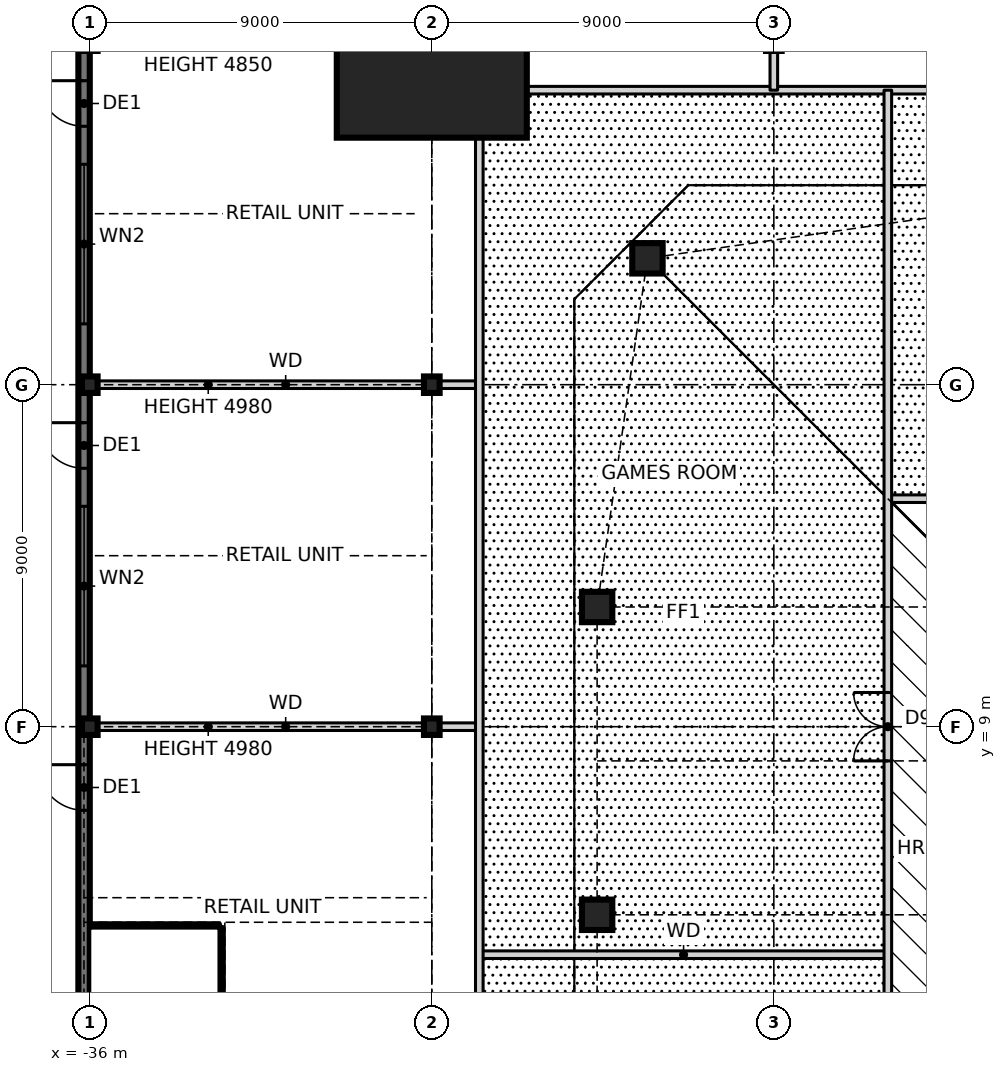
"""IFC4 building model, lengths in metres.
Left out: names, types, materials, properties, quantities, classifications, styles, units other than length and angle.
Written with IfcOpenShell. Run it as: python <this file> out.ifc"""

import sys

from ifc_helpers import new_model, si_unit, direction, frame, frame_2d, origin, origin_2d, place, context, subcontext, project, spatial, rectangle, hollow_rectangle, i_section, extrude, element, fill, save


model = new_model("IFC4")
c1 = context("Model", 3, precision=1e-05, world=origin(), true_north=direction((0.0, 1.0)))
c2 = subcontext(c1, "Body", "Model", "MODEL_VIEW")
j1 = project(units=[si_unit("LENGTHUNIT", "METRE"), si_unit("PLANEANGLEUNIT", "RADIAN")], contexts=[c1])
p1 = place(None, origin())
s1 = spatial("IfcSite", under=j1, at=p1, CompositionType="ELEMENT")
p2 = place(p1, origin())
s2 = spatial("IfcBuilding", under=s1, at=p2, CompositionType="ELEMENT")
p3 = place(p2, origin())
s3 = spatial("IfcBuildingStorey", under=s2, at=p3, CompositionType="ELEMENT", Elevation=0.0)
for number, where, z_axis, x_axis in (
    (1, (-21.326, 21.326, 0.0), (0.0, 0.0, 1.0), (1.0, 0.0, 0.0)),
    (2, (-22.65, 12.15, 0.0), (0.0, 0.0, 1.0), (1.0, 0.0, 0.0)),
    (3, (-22.65, 4.05, 0.0), (0.0, 0.0, 1.0), (1.0, 0.0, 0.0)),
):
    element("IfcColumn", number, at=place(p3, frame(where, z_axis=z_axis, x_axis=x_axis)), inside=s3, PredefinedType="COLUMN", context=c2, shape_type="SweptSolid", body=[
        extrude(hollow_rectangle(XDim=0.8, YDim=0.8, WallThickness=0.09, at=origin_2d()), origin(), (0.0, 0.0, 1.0), 6.0),
    ])
p4 = place(p3, frame((-27.0, 27.0, 0.0), z_axis=(0.0, 0.0, 1.0), x_axis=(1.0, 0.0, 0.0)))
e4 = element("IfcColumn", 4, at=p4, inside=s3, PredefinedType="COLUMN", context=c2, shape_type="SweptSolid", body=[
    extrude(rectangle(XDim=5.0, YDim=5.0, at=origin_2d()), origin(), (0.0, 0.0, 1.0), 6.0),
    extrude(i_section(OverallWidth=0.478, OverallDepth=0.599, WebThickness=0.1, FlangeThickness=0.14, at=origin_2d()), origin(), (0.0, 0.0, 1.0), 6.0),
])
for number, where, z_axis, x_axis in (
    (5, (-36.0, 9.0, 0.0), (0.0, 0.0, 1.0), (1.0, 0.0, 0.0)),
    (6, (-36.0, 18.0, 0.0), (0.0, 0.0, 1.0), (1.0, 0.0, 0.0)),
    (7, (-27.0, 9.0, 0.0), (0.0, 0.0, 1.0), (1.0, 0.0, 0.0)),
    (8, (-27.0, 18.0, 0.0), (0.0, 0.0, 1.0), (1.0, 0.0, 0.0)),
):
    element("IfcColumn", number, at=place(p3, frame(where, z_axis=z_axis, x_axis=x_axis)), inside=s3, PredefinedType="COLUMN", context=c2, shape_type="SweptSolid", body=[
        extrude(i_section(OverallWidth=0.411, OverallDepth=0.434, WebThickness=0.036, FlangeThickness=0.057, at=origin_2d()), origin(), (0.0, 0.0, 1.0), 6.0),
    ])
p5 = place(p3, frame((-36.15, 36.3, -0.25), z_axis=(0.0, 0.0, 1.0), x_axis=(0.0, -1.0, 0.0)))
e9 = element("IfcWall", 9, at=p5, inside=s3, PredefinedType="SOLIDWALL", context=c2, shape_type="SweptSolid", body=[
    extrude(rectangle(XDim=72.6, YDim=0.3, at=frame_2d((36.3, 0.0))), origin(), (0.0, 0.0, 1.0), 5.23),
])
p6 = place(p5, frame((55.3, 0.0, 0.25)))
e10 = element("IfcOpeningElement", 10, at=p6, cuts=e9, PredefinedType="OPENING", context=c2, shape_type="SweptSolid", body=[
    extrude(rectangle(XDim=1.2, YDim=2.4, at=frame_2d((0.6, 1.2))), frame((0.0, 0.16, 0.0), z_axis=(0.0, -1.0, 0.0), x_axis=(1.0, 0.0, 0.0)), (0.0, 0.0, 1.0), 0.32),
])
p7 = place(p5, frame((57.5, 0.0, 0.85)))
e11 = element("IfcOpeningElement", 11, at=p7, cuts=e9, PredefinedType="OPENING", context=c2, shape_type="SweptSolid", body=[
    extrude(rectangle(XDim=4.2, YDim=3.6, at=frame_2d((2.1, 1.8))), frame((0.0, 0.16, 0.0), z_axis=(0.0, -1.0, 0.0), x_axis=(1.0, 0.0, 0.0)), (0.0, 0.0, 1.0), 0.32),
])
p8 = place(p5, frame((46.3, 0.0, 0.25)))
e12 = element("IfcOpeningElement", 12, at=p8, cuts=e9, PredefinedType="OPENING", context=c2, shape_type="SweptSolid", body=[
    extrude(rectangle(XDim=1.2, YDim=2.4, at=frame_2d((0.6, 1.2))), frame((0.0, 0.16, 0.0), z_axis=(0.0, -1.0, 0.0), x_axis=(1.0, 0.0, 0.0)), (0.0, 0.0, 1.0), 0.32),
])
p9 = place(p5, frame((48.5, 0.0, 0.85)))
e13 = element("IfcOpeningElement", 13, at=p9, cuts=e9, PredefinedType="OPENING", context=c2, shape_type="SweptSolid", body=[
    extrude(rectangle(XDim=4.2, YDim=3.6, at=frame_2d((2.1, 1.8))), frame((0.0, 0.16, 0.0), z_axis=(0.0, -1.0, 0.0), x_axis=(1.0, 0.0, 0.0)), (0.0, 0.0, 1.0), 0.32),
])
p10 = place(p5, frame((19.3, 0.0, 0.25)))
e14 = element("IfcOpeningElement", 14, at=p10, cuts=e9, PredefinedType="OPENING", context=c2, shape_type="SweptSolid", body=[
    extrude(rectangle(XDim=1.2, YDim=2.4, at=frame_2d((0.6, 1.2))), frame((0.0, 0.16, 0.0), z_axis=(0.0, -1.0, 0.0), x_axis=(1.0, 0.0, 0.0)), (0.0, 0.0, 1.0), 0.32),
])
p11 = place(p5, frame((21.5, 0.0, 0.85)))
e15 = element("IfcOpeningElement", 15, at=p11, cuts=e9, PredefinedType="OPENING", context=c2, shape_type="SweptSolid", body=[
    extrude(rectangle(XDim=4.2, YDim=3.6, at=frame_2d((2.1, 1.8))), frame((0.0, 0.16, 0.0), z_axis=(0.0, -1.0, 0.0), x_axis=(1.0, 0.0, 0.0)), (0.0, 0.0, 1.0), 0.32),
])
p12 = place(p5, frame((10.3, 0.0, 0.25)))
e16 = element("IfcOpeningElement", 16, at=p12, cuts=e9, PredefinedType="OPENING", context=c2, shape_type="SweptSolid", body=[
    extrude(rectangle(XDim=1.2, YDim=2.4, at=frame_2d((0.6, 1.2))), frame((0.0, 0.16, 0.0), z_axis=(0.0, -1.0, 0.0), x_axis=(1.0, 0.0, 0.0)), (0.0, 0.0, 1.0), 0.32),
])
p13 = place(p5, frame((12.5, 0.0, 0.85)))
e17 = element("IfcOpeningElement", 17, at=p13, cuts=e9, PredefinedType="OPENING", context=c2, shape_type="SweptSolid", body=[
    extrude(rectangle(XDim=4.2, YDim=3.6, at=frame_2d((2.1, 1.8))), frame((0.0, 0.16, 0.0), z_axis=(0.0, -1.0, 0.0), x_axis=(1.0, 0.0, 0.0)), (0.0, 0.0, 1.0), 0.32),
])
p14 = place(p5, frame((38.55, 0.0, 0.25)))
e18 = element("IfcOpeningElement", 18, at=p14, cuts=e9, PredefinedType="OPENING", context=c2, shape_type="SweptSolid", body=[
    extrude(rectangle(XDim=1.2, YDim=2.4, at=frame_2d((0.6, 1.2))), frame((0.0, 0.16, 0.0), z_axis=(0.0, -1.0, 0.0), x_axis=(1.0, 0.0, 0.0)), (0.0, 0.0, 1.0), 0.32),
])
p15 = place(p5, frame((42.3, 0.0, 0.25)))
e19 = element("IfcOpeningElement", 19, at=p15, cuts=e9, PredefinedType="OPENING", context=c2, shape_type="SweptSolid", body=[
    extrude(rectangle(XDim=1.2, YDim=2.4, at=frame_2d((0.6, 1.2))), frame((0.0, 0.16, 0.0), z_axis=(0.0, -1.0, 0.0), x_axis=(1.0, 0.0, 0.0)), (0.0, 0.0, 1.0), 0.32),
])
p16 = place(p5, frame((28.3, 0.0, 0.25)))
e20 = element("IfcOpeningElement", 20, at=p16, cuts=e9, PredefinedType="OPENING", context=c2, shape_type="SweptSolid", body=[
    extrude(rectangle(XDim=1.2, YDim=2.4, at=frame_2d((0.6, 1.2))), frame((0.0, 0.16, 0.0), z_axis=(0.0, -1.0, 0.0), x_axis=(1.0, 0.0, 0.0)), (0.0, 0.0, 1.0), 0.32),
])
p17 = place(p3, frame((-25.75, 3.0, 0.0), z_axis=(0.0, 0.0, 1.0), x_axis=(1.0, 0.0, 0.0)))
e21 = element("IfcWall", 21, at=p17, inside=s3, PredefinedType="SOLIDWALL", context=c2, shape_type="SweptSolid", body=[
    extrude(rectangle(XDim=10.75, YDim=0.2, at=frame_2d((5.375, 0.0))), origin(), (0.0, 0.0, 1.0), 5.75),
])
p18 = place(p3, frame((-35.94, 3.7, 0.0), z_axis=(0.0, 0.0, 1.0), x_axis=(1.0, 0.0, 0.0)))
e22 = element("IfcWall", 22, at=p18, inside=s3, PredefinedType="SOLIDWALL", context=c2, shape_type="SweptSolid", body=[
    extrude(rectangle(XDim=3.34, YDim=0.2, at=frame_2d((1.67, 0.0))), origin(), (0.0, 0.0, 1.0), 6.0),
])
p19 = place(p3, frame((-35.94, 9.0, 0.0), z_axis=(0.0, 0.0, 1.0), x_axis=(1.0, 0.0, 0.0)))
e23 = element("IfcWall", 23, at=p19, inside=s3, PredefinedType="SOLIDWALL", context=c2, shape_type="SweptSolid", body=[
    extrude(rectangle(XDim=10.19, YDim=0.2, at=frame_2d((5.095, 0.0))), origin(), (0.0, 0.0, 1.0), 4.98),
])
p20 = place(p3, frame((-15.0, 15.0, 0.0), z_axis=(0.0, 0.0, 1.0), x_axis=(1.0, 0.0, 0.0)))
e24 = element("IfcWall", 24, at=p20, inside=s3, PredefinedType="SOLIDWALL", context=c2, shape_type="SweptSolid", body=[
    extrude(rectangle(XDim=30.0, YDim=0.2, at=frame_2d((15.0, 0.0))), origin(), (0.0, 0.0, 1.0), 5.75),
])
p21 = place(p20, frame((9.15, 0.0, 0.0)))
e25 = element("IfcOpeningElement", 25, at=p21, cuts=e24, PredefinedType="OPENING", context=c2, shape_type="SweptSolid", body=[
    extrude(rectangle(XDim=0.9, YDim=2.1, at=frame_2d((0.45, 1.05))), frame((0.0, 0.11, 0.0), z_axis=(0.0, -1.0, 0.0), x_axis=(1.0, 0.0, 0.0)), (0.0, 0.0, 1.0), 0.22),
])
p22 = place(p20, frame((12.75, 0.0, 0.0)))
e26 = element("IfcOpeningElement", 26, at=p22, cuts=e24, PredefinedType="OPENING", context=c2, shape_type="SweptSolid", body=[
    extrude(rectangle(XDim=0.9, YDim=2.1, at=frame_2d((0.45, 1.05))), frame((0.0, 0.11, 0.0), z_axis=(0.0, -1.0, 0.0), x_axis=(1.0, 0.0, 0.0)), (0.0, 0.0, 1.0), 0.22),
])
p23 = place(p20, frame((15.85, 0.0, 0.0)))
e27 = element("IfcOpeningElement", 27, at=p23, cuts=e24, PredefinedType="OPENING", context=c2, shape_type="SweptSolid", body=[
    extrude(rectangle(XDim=0.9, YDim=2.1, at=frame_2d((0.45, 1.05))), frame((0.0, 0.11, 0.0), z_axis=(0.0, -1.0, 0.0), x_axis=(1.0, 0.0, 0.0)), (0.0, 0.0, 1.0), 0.22),
])
p24 = place(p20, frame((22.9, 0.0, 0.0)))
e28 = element("IfcOpeningElement", 28, at=p24, cuts=e24, PredefinedType="OPENING", context=c2, shape_type="SweptSolid", body=[
    extrude(rectangle(XDim=1.8, YDim=2.1, at=frame_2d((0.9, 1.05))), frame((0.0, 0.11, 0.0), z_axis=(0.0, -1.0, 0.0), x_axis=(1.0, 0.0, 0.0)), (0.0, 0.0, 1.0), 0.22),
])
p25 = place(p3, frame((-35.94, 18.0, 0.0), z_axis=(0.0, 0.0, 1.0), x_axis=(1.0, 0.0, 0.0)))
e29 = element("IfcWall", 29, at=p25, inside=s3, PredefinedType="SOLIDWALL", context=c2, shape_type="SweptSolid", body=[
    extrude(rectangle(XDim=10.19, YDim=0.2, at=frame_2d((5.095, 0.0))), origin(), (0.0, 0.0, 1.0), 4.98),
])
p26 = place(p3, frame((-25.75, 25.75, 0.0), z_axis=(0.0, 0.0, 1.0), x_axis=(1.0, 0.0, 0.0)))
e30 = element("IfcWall", 30, at=p26, inside=s3, PredefinedType="SOLIDWALL", context=c2, shape_type="SweptSolid", body=[
    extrude(rectangle(XDim=51.5, YDim=0.2, at=frame_2d((25.75, 0.0))), origin(), (0.0, 0.0, 1.0), 5.75),
])
p27 = place(p3, frame((-15.0, -25.75, 0.0), z_axis=(0.0, 0.0, 1.0), x_axis=(0.0, 1.0, 0.0)))
e31 = element("IfcWall", 31, at=p27, inside=s3, PredefinedType="SOLIDWALL", context=c2, shape_type="SweptSolid", body=[
    extrude(rectangle(XDim=51.5, YDim=0.2, at=frame_2d((25.75, 0.0))), origin(), (0.0, 0.0, 1.0), 5.75),
])
p28 = place(p27, frame((33.85, 0.0, 0.0)))
e32 = element("IfcOpeningElement", 32, at=p28, cuts=e31, PredefinedType="OPENING", context=c2, shape_type="SweptSolid", body=[
    extrude(rectangle(XDim=1.8, YDim=2.1, at=frame_2d((0.9, 1.05))), frame((0.0, 0.11, 0.0), z_axis=(0.0, -1.0, 0.0), x_axis=(1.0, 0.0, 0.0)), (0.0, 0.0, 1.0), 0.22),
])
p29 = place(p27, frame((24.85, 0.0, 0.0)))
e33 = element("IfcOpeningElement", 33, at=p29, cuts=e31, PredefinedType="OPENING", context=c2, shape_type="SweptSolid", body=[
    extrude(rectangle(XDim=1.8, YDim=2.1, at=frame_2d((0.9, 1.05))), frame((0.0, 0.11, 0.0), z_axis=(0.0, -1.0, 0.0), x_axis=(1.0, 0.0, 0.0)), (0.0, 0.0, 1.0), 0.22),
])
p30 = place(p27, frame((15.85, 0.0, 0.0)))
e34 = element("IfcOpeningElement", 34, at=p30, cuts=e31, PredefinedType="OPENING", context=c2, shape_type="SweptSolid", body=[
    extrude(rectangle(XDim=1.8, YDim=2.1, at=frame_2d((0.9, 1.05))), frame((0.0, 0.11, 0.0), z_axis=(0.0, -1.0, 0.0), x_axis=(1.0, 0.0, 0.0)), (0.0, 0.0, 1.0), 0.22),
])
p31 = place(p3, frame((-18.0, 25.75, 0.0), z_axis=(0.0, 0.0, 1.0), x_axis=(0.0, 1.0, 0.0)))
e35 = element("IfcWall", 35, at=p31, inside=s3, PredefinedType="SOLIDWALL", context=c2, shape_type="SweptSolid", body=[
    extrude(rectangle(XDim=10.19, YDim=0.2, at=frame_2d((5.095, 0.0))), origin(), (0.0, 0.0, 1.0), 4.98),
])
p32 = place(p3, frame((-25.75, -27.0, 0.0), z_axis=(0.0, 0.0, 1.0), x_axis=(0.0, 1.0, 0.0)))
e36 = element("IfcWall", 36, at=p32, inside=s3, PredefinedType="SOLIDWALL", context=c2, shape_type="SweptSolid", body=[
    extrude(rectangle(XDim=54.0, YDim=0.2, at=frame_2d((27.0, 0.0))), origin(), (0.0, 0.0, 1.0), 5.75),
])
p33 = place(p3, frame((-32.6, -3.7, 0.0), z_axis=(0.0, 0.0, 1.0), x_axis=(0.0, 1.0, 0.0)))
e37 = element("IfcWall", 37, at=p33, inside=s3, PredefinedType="SOLIDWALL", context=c2, shape_type="SweptSolid", body=[
    extrude(rectangle(XDim=7.4, YDim=0.2, at=frame_2d((3.7, 0.0))), origin(), (0.0, 0.0, 1.0), 6.0),
])
p34 = place(p10, frame((1.2, 0.0, 0.0), z_axis=(0.0, 0.0, 1.0), x_axis=(-1.0, 0.0, 0.0)))
e38 = element("IfcDoor", 38, at=p34, inside=s3, OperationType="SINGLE_SWING_RIGHT", PredefinedType="DOOR", context=c2, shape_type="SweptSolid", body=[
    extrude(rectangle(XDim=1.2, YDim=2.4, at=frame_2d((0.6, 1.2))), frame((0.0, 0.025, 0.0), z_axis=(0.0, -1.0, 0.0), x_axis=(1.0, 0.0, 0.0)), (0.0, 0.0, 1.0), 0.05),
])
fill(e14, e38)
p35 = place(p11, origin())
e39 = element("IfcWindow", 39, at=p35, inside=s3, PartitioningType="SINGLE_PANEL", PredefinedType="WINDOW", context=c2, shape_type="SweptSolid", body=[
    extrude(rectangle(XDim=4.2, YDim=3.6, at=frame_2d((2.1, 1.8))), frame((0.0, 0.03, 0.0), z_axis=(0.0, -1.0, 0.0), x_axis=(1.0, 0.0, 0.0)), (0.0, 0.0, 1.0), 0.06),
])
fill(e15, e39)
p36 = place(p12, frame((1.2, 0.0, 0.0), z_axis=(0.0, 0.0, 1.0), x_axis=(-1.0, 0.0, 0.0)))
e40 = element("IfcDoor", 40, at=p36, inside=s3, OperationType="SINGLE_SWING_RIGHT", PredefinedType="DOOR", context=c2, shape_type="SweptSolid", body=[
    extrude(rectangle(XDim=1.2, YDim=2.4, at=frame_2d((0.6, 1.2))), frame((0.0, 0.025, 0.0), z_axis=(0.0, -1.0, 0.0), x_axis=(1.0, 0.0, 0.0)), (0.0, 0.0, 1.0), 0.05),
])
fill(e16, e40)
p37 = place(p13, origin())
e41 = element("IfcWindow", 41, at=p37, inside=s3, PartitioningType="SINGLE_PANEL", PredefinedType="WINDOW", context=c2, shape_type="SweptSolid", body=[
    extrude(rectangle(XDim=4.2, YDim=3.6, at=frame_2d((2.1, 1.8))), frame((0.0, 0.03, 0.0), z_axis=(0.0, -1.0, 0.0), x_axis=(1.0, 0.0, 0.0)), (0.0, 0.0, 1.0), 0.06),
])
fill(e17, e41)
p38 = place(p16, frame((1.2, 0.0, 0.0), z_axis=(0.0, 0.0, 1.0), x_axis=(-1.0, 0.0, 0.0)))
e42 = element("IfcDoor", 42, at=p38, inside=s3, OperationType="SINGLE_SWING_RIGHT", PredefinedType="DOOR", context=c2, shape_type="SweptSolid", body=[
    extrude(rectangle(XDim=1.2, YDim=2.4, at=frame_2d((0.6, 1.2))), frame((0.0, 0.025, 0.0), z_axis=(0.0, -1.0, 0.0), x_axis=(1.0, 0.0, 0.0)), (0.0, 0.0, 1.0), 0.05),
])
fill(e20, e42)
p39 = place(p28, origin())
e43 = element("IfcDoor", 43, at=p39, inside=s3, OperationType="DOUBLE_DOOR_SINGLE_SWING", PredefinedType="DOOR", context=c2, shape_type="SweptSolid", body=[
    extrude(rectangle(XDim=1.8, YDim=2.1, at=frame_2d((0.9, 1.05))), frame((0.0, 0.025, 0.0), z_axis=(0.0, -1.0, 0.0), x_axis=(1.0, 0.0, 0.0)), (0.0, 0.0, 1.0), 0.05),
])
fill(e32, e43)
save(model, sys.argv[1])
